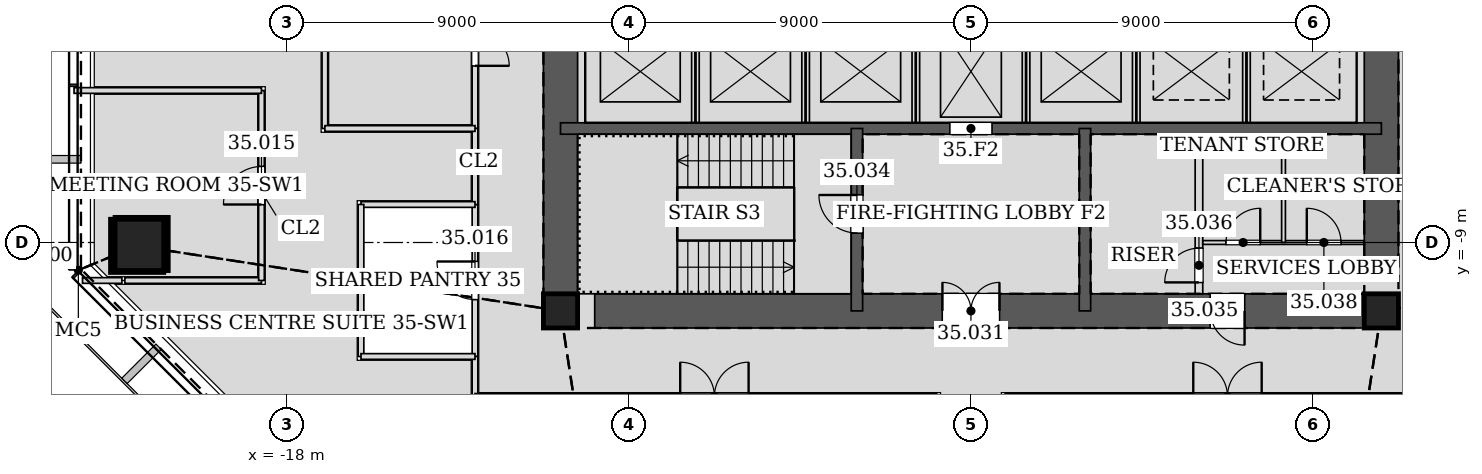
"""IFC4 building model, lengths in metres.
Left out: names, types, materials, properties, quantities, classifications, styles, units other than length and angle.
Written with IfcOpenShell. Run it as: python <this file> out.ifc"""

import sys

from ifc_helpers import new_model, si_unit, direction, frame, frame_2d, origin, origin_2d, place, context, subcontext, project, spatial, rectangle, hollow_rectangle, extrude, element, fill, save


model = new_model("IFC4")
c1 = context("Model", 3, precision=1e-05, world=origin(), true_north=direction((0.0, 1.0)))
c2 = subcontext(c1, "Body", "Model", "MODEL_VIEW")
j1 = project(units=[si_unit("LENGTHUNIT", "METRE"), si_unit("PLANEANGLEUNIT", "RADIAN")], contexts=[c1])
p1 = place(None, origin())
s1 = spatial("IfcSite", under=j1, at=p1, CompositionType="ELEMENT")
p2 = place(p1, origin())
s2 = spatial("IfcBuilding", under=s1, at=p2, CompositionType="ELEMENT")
p3 = place(p2, frame((0.0, 0.0, 155.4)))
s3 = spatial("IfcBuildingStorey", under=s2, at=p3, CompositionType="ELEMENT", Elevation=155.4)
p4 = place(p3, frame((-21.94, -9.088, 0.0), z_axis=(0.028294087032, 0.011735945751, 0.999530746009), x_axis=(-0.383133442967, 0.923693003589, 0.0)))
e1 = element("IfcColumn", 1, at=p4, inside=s3, PredefinedType="COLUMN", context=c2, shape_type="SweptSolid", body=[
    extrude(hollow_rectangle(XDim=1.4, YDim=1.4, WallThickness=0.065, at=origin_2d()), origin(), (0.0, 0.0, 1.0), 4.202),
])
for number, where, z_axis, x_axis in (
    (2, (-10.8, -10.8, 0.0), (0.0, 0.0, 1.0), (1.0, 0.0, 0.0)),
    (3, (10.8, -10.8, 0.0), (0.0, 0.0, 1.0), (1.0, 0.0, 0.0)),
):
    element("IfcColumn", number, at=place(p3, frame(where, z_axis=z_axis, x_axis=x_axis)), inside=s3, PredefinedType="COLUMN", context=c2, shape_type="SweptSolid", body=[
        extrude(hollow_rectangle(XDim=0.9, YDim=0.9, WallThickness=0.06, at=origin_2d()), origin(), (0.0, 0.0, 1.0), 4.2),
    ])
p5 = place(p3, frame((-10.8, -10.8, 0.0), z_axis=(0.0, 0.0, 1.0), x_axis=(1.0, 0.0, 0.0)))
e4 = element("IfcWall", 4, at=p5, inside=s3, PredefinedType="SOLIDWALL", context=c2, shape_type="SweptSolid", body=[
    extrude(rectangle(XDim=21.6, YDim=0.9, at=frame_2d((10.8, 0.0))), origin(), (0.0, 0.0, 1.0), 4.2),
])
p6 = place(p5, frame((10.05, 0.0, 0.0)))
e5 = element("IfcOpeningElement", 5, at=p6, cuts=e4, PredefinedType="OPENING", context=c2, shape_type="SweptSolid", body=[
    extrude(rectangle(XDim=1.5, YDim=2.1, at=frame_2d((0.75, 1.05))), frame((0.0, 0.46, 0.0), z_axis=(0.0, -1.0, 0.0), x_axis=(1.0, 0.0, 0.0)), (0.0, 0.0, 1.0), 0.92),
])
p7 = place(p5, frame((17.1, 0.0, 0.0)))
e6 = element("IfcOpeningElement", 6, at=p7, cuts=e4, PredefinedType="OPENING", context=c2, shape_type="SweptSolid", body=[
    extrude(rectangle(XDim=0.9, YDim=2.1, at=frame_2d((0.45, 1.05))), frame((0.0, 0.46, 0.0), z_axis=(0.0, -1.0, 0.0), x_axis=(1.0, 0.0, 0.0)), (0.0, 0.0, 1.0), 0.92),
])
p8 = place(p3, frame((10.8, -10.8, 0.0), z_axis=(0.0, 0.0, 1.0), x_axis=(0.0, 1.0, 0.0)))
e7 = element("IfcWall", 7, at=p8, inside=s3, PredefinedType="SOLIDWALL", context=c2, shape_type="SweptSolid", body=[
    extrude(rectangle(XDim=21.6, YDim=0.9, at=frame_2d((10.8, 0.0))), origin(), (0.0, 0.0, 1.0), 4.2),
])
p9 = place(p8, frame((11.7, 0.0, 0.0)))
e8 = element("IfcOpeningElement", 8, at=p9, cuts=e7, PredefinedType="OPENING", context=c2, shape_type="SweptSolid", body=[
    extrude(rectangle(XDim=1.2, YDim=2.1, at=frame_2d((0.6, 1.05))), frame((0.0, 0.46, 0.0), z_axis=(0.0, -1.0, 0.0), x_axis=(1.0, 0.0, 0.0)), (0.0, 0.0, 1.0), 0.92),
])
p10 = place(p8, frame((8.7, 0.0, 0.0)))
e9 = element("IfcOpeningElement", 9, at=p10, cuts=e7, PredefinedType="OPENING", context=c2, shape_type="SweptSolid", body=[
    extrude(rectangle(XDim=1.2, YDim=2.1, at=frame_2d((0.6, 1.05))), frame((0.0, 0.46, 0.0), z_axis=(0.0, -1.0, 0.0), x_axis=(1.0, 0.0, 0.0)), (0.0, 0.0, 1.0), 0.92),
])
p11 = place(p3, frame((-10.8, 10.8, 0.0), z_axis=(0.0, 0.0, 1.0), x_axis=(0.0, -1.0, 0.0)))
e10 = element("IfcWall", 10, at=p11, inside=s3, PredefinedType="SOLIDWALL", context=c2, shape_type="SweptSolid", body=[
    extrude(rectangle(XDim=21.6, YDim=0.9, at=frame_2d((10.8, 0.0))), origin(), (0.0, 0.0, 1.0), 4.2),
])
p12 = place(p11, frame((8.7, 0.0, 0.0)))
e11 = element("IfcOpeningElement", 11, at=p12, cuts=e10, PredefinedType="OPENING", context=c2, shape_type="SweptSolid", body=[
    extrude(rectangle(XDim=1.2, YDim=2.1, at=frame_2d((0.6, 1.05))), frame((0.0, 0.46, 0.0), z_axis=(0.0, -1.0, 0.0), x_axis=(1.0, 0.0, 0.0)), (0.0, 0.0, 1.0), 0.92),
])
p13 = place(p11, frame((11.7, 0.0, 0.0)))
e12 = element("IfcOpeningElement", 12, at=p13, cuts=e10, PredefinedType="OPENING", context=c2, shape_type="SweptSolid", body=[
    extrude(rectangle(XDim=1.2, YDim=2.1, at=frame_2d((0.6, 1.05))), frame((0.0, 0.46, 0.0), z_axis=(0.0, -1.0, 0.0), x_axis=(1.0, 0.0, 0.0)), (0.0, 0.0, 1.0), 0.92),
])
p14 = place(p3, frame((-10.8, -6.0, 0.0), z_axis=(0.0, 0.0, 1.0), x_axis=(1.0, 0.0, 0.0)))
e13 = element("IfcWall", 13, at=p14, inside=s3, PredefinedType="SOLIDWALL", context=c2, shape_type="SweptSolid", body=[
    extrude(rectangle(XDim=21.6, YDim=0.3, at=frame_2d((10.8, 0.0))), origin(), (0.0, 0.0, 1.0), 4.2),
])
p15 = place(p14, frame((10.25, 0.0, 0.0)))
e14 = element("IfcOpeningElement", 14, at=p15, cuts=e13, PredefinedType="OPENING", context=c2, shape_type="SweptSolid", body=[
    extrude(rectangle(XDim=1.1, YDim=2.1, at=frame_2d((0.55, 1.05))), frame((0.0, 0.16, 0.0), z_axis=(0.0, -1.0, 0.0), x_axis=(1.0, 0.0, 0.0)), (0.0, 0.0, 1.0), 0.32),
])
p16 = place(p3, frame((-3.0, -6.0, 0.0), z_axis=(0.0, 0.0, 1.0), x_axis=(0.0, -1.0, 0.0)))
e15 = element("IfcWall", 15, at=p16, inside=s3, PredefinedType="SOLIDWALL", context=c2, shape_type="SweptSolid", body=[
    extrude(rectangle(XDim=4.8, YDim=0.3, at=frame_2d((2.4, 0.0))), origin(), (0.0, 0.0, 1.0), 4.2),
])
p17 = place(p16, frame((1.75, 0.0, 0.0)))
e16 = element("IfcOpeningElement", 16, at=p17, cuts=e15, PredefinedType="OPENING", context=c2, shape_type="SweptSolid", body=[
    extrude(rectangle(XDim=1.0, YDim=2.1, at=frame_2d((0.5, 1.05))), frame((0.0, 0.16, 0.0), z_axis=(0.0, -1.0, 0.0), x_axis=(1.0, 0.0, 0.0)), (0.0, 0.0, 1.0), 0.32),
])
p18 = place(p3, frame((3.0, -6.0, 0.0), z_axis=(0.0, 0.0, 1.0), x_axis=(0.0, -1.0, 0.0)))
e17 = element("IfcWall", 17, at=p18, inside=s3, PredefinedType="SOLIDWALL", context=c2, shape_type="SweptSolid", body=[
    extrude(rectangle(XDim=4.8, YDim=0.3, at=frame_2d((2.4, 0.0))), origin(), (0.0, 0.0, 1.0), 4.2),
])
p19 = place(p3, frame((-13.05, -7.999, 0.0), z_axis=(0.0, 0.0, 1.0), x_axis=(0.0, -1.0, 0.0)))
e18 = element("IfcWall", 18, at=p19, inside=s3, PredefinedType="PARTITIONING", context=c2, shape_type="SweptSolid", body=[
    extrude(rectangle(XDim=4.002, YDim=0.15, at=frame_2d((2.001, 0.0))), origin(), (0.0, 0.0, 1.0), 3.098),
])
p20 = place(p19, frame((1.501, 0.0, 0.0)))
e19 = element("IfcOpeningElement", 19, at=p20, cuts=e18, PredefinedType="OPENING", context=c2, shape_type="SweptSolid", body=[
    extrude(rectangle(XDim=1.0, YDim=2.1, at=frame_2d((0.5, 1.05))), frame((0.0, 0.085, 0.0), z_axis=(0.0, -1.0, 0.0), x_axis=(1.0, 0.0, 0.0)), (0.0, 0.0, 1.0), 0.17),
])
p21 = place(p3, frame((-13.05, -0.9, 0.0), z_axis=(0.0, 0.0, 1.0), x_axis=(0.0, -1.0, 0.0)))
e20 = element("IfcWall", 20, at=p21, inside=s3, PredefinedType="PARTITIONING", context=c2, shape_type="SweptSolid", body=[
    extrude(rectangle(XDim=5.101, YDim=0.15, at=frame_2d((2.551, 0.0))), origin(), (0.0, 0.0, 1.0), 4.035),
])
p22 = place(p21, frame((1.65, 0.0, 0.0)))
e21 = element("IfcOpeningElement", 21, at=p22, cuts=e20, PredefinedType="OPENING", context=c2, shape_type="SweptSolid", body=[
    extrude(rectangle(XDim=1.8, YDim=2.4, at=frame_2d((0.9, 1.2))), frame((0.0, 0.085, 0.0), z_axis=(0.0, -1.0, 0.0), x_axis=(1.0, 0.0, 0.0)), (0.0, 0.0, 1.0), 0.17),
])
p23 = place(p3, frame((-13.05, -11.999, 0.0), z_axis=(0.0, 0.0, 1.0), x_axis=(0.0, -1.0, 0.0)))
e22 = element("IfcWall", 22, at=p23, inside=s3, PredefinedType="PARTITIONING", context=c2, shape_type="SweptSolid", body=[
    extrude(rectangle(XDim=1.051, YDim=0.15, at=frame_2d((0.525, 0.0))), origin(), (0.0, 0.0, 1.0), 3.332),
])
p24 = place(p3, frame((-13.05, -13.05, 0.0), z_axis=(0.0, 0.0, 1.0), x_axis=(1.0, 0.0, 0.0)))
e23 = element("IfcWall", 23, at=p24, inside=s3, PredefinedType="PARTITIONING", context=c2, shape_type="SweptSolid", body=[
    extrude(rectangle(XDim=0.451, YDim=0.15, at=frame_2d((0.226, 0.0))), origin(), (0.0, 0.0, 1.0), 3.332),
])
p25 = place(p3, frame((-13.05, -5.999, 0.0), z_axis=(0.0, 0.0, 1.0), x_axis=(0.0, -1.0, 0.0)))
e24 = element("IfcWall", 24, at=p25, inside=s3, PredefinedType="PARTITIONING", context=c2, shape_type="SweptSolid", body=[
    extrude(rectangle(XDim=2.002, YDim=0.15, at=frame_2d((1.001, 0.0))), origin(), (0.0, 0.0, 1.0), 4.035),
])
p26 = place(p3, frame((-12.601, -13.05, 0.0), z_axis=(0.0, 0.0, 1.0), x_axis=(1.0, 0.0, 0.0)))
e25 = element("IfcWall", 25, at=p26, inside=s3, PredefinedType="PARTITIONING", context=c2, shape_type="SweptSolid", body=[
    extrude(rectangle(XDim=11.701, YDim=0.15, at=frame_2d((5.851, 0.0))), origin(), (0.0, 0.0, 1.0), 3.098),
])
p27 = place(p26, frame((4.95, 0.0, 0.0)))
e26 = element("IfcOpeningElement", 26, at=p27, cuts=e25, PredefinedType="OPENING", context=c2, shape_type="SweptSolid", body=[
    extrude(rectangle(XDim=1.8, YDim=2.4, at=frame_2d((0.9, 1.2))), frame((0.0, 0.085, 0.0), z_axis=(0.0, -1.0, 0.0), x_axis=(1.0, 0.0, 0.0)), (0.0, 0.0, 1.0), 0.17),
])
p28 = place(p3, frame((0.9, -13.05, 0.0), z_axis=(0.0, 0.0, 1.0), x_axis=(1.0, 0.0, 0.0)))
e27 = element("IfcWall", 27, at=p28, inside=s3, PredefinedType="PARTITIONING", context=c2, shape_type="SweptSolid", body=[
    extrude(rectangle(XDim=11.701, YDim=0.15, at=frame_2d((5.851, 0.0))), origin(), (0.0, 0.0, 1.0), 3.098),
])
p29 = place(p28, frame((4.95, 0.0, 0.0)))
e28 = element("IfcOpeningElement", 28, at=p29, cuts=e27, PredefinedType="OPENING", context=c2, shape_type="SweptSolid", body=[
    extrude(rectangle(XDim=1.8, YDim=2.4, at=frame_2d((0.9, 1.2))), frame((0.0, 0.085, 0.0), z_axis=(0.0, -1.0, 0.0), x_axis=(1.0, 0.0, 0.0)), (0.0, 0.0, 1.0), 0.17),
])
p30 = place(p3, frame((-23.378, -10.0, 0.0), z_axis=(0.0, 0.0, 1.0), x_axis=(1.0, 0.0, 0.0)))
e29 = element("IfcWall", 29, at=p30, inside=s3, PredefinedType="PARTITIONING", context=c2, shape_type="SweptSolid", body=[
    extrude(rectangle(XDim=1.037, YDim=0.15, at=frame_2d((0.518, 0.0))), origin(), (0.0, 0.0, 1.0), 4.035),
])
p31 = place(p3, frame((-22.263, -10.0, 0.0), z_axis=(0.0, 0.0, 1.0), x_axis=(1.0, 0.0, 0.0)))
e30 = element("IfcWall", 30, at=p31, inside=s3, PredefinedType="PARTITIONING", context=c2, shape_type="SweptSolid", body=[
    extrude(rectangle(XDim=3.594, YDim=0.15, at=frame_2d((1.797, 0.0))), origin(), (0.0, 0.0, 1.0), 3.499),
])
p32 = place(p3, frame((-18.669, -10.0, 0.0), z_axis=(0.0, 0.0, 1.0), x_axis=(0.0, 1.0, 0.0)))
e31 = element("IfcWall", 31, at=p32, inside=s3, PredefinedType="PARTITIONING", context=c2, shape_type="SweptSolid", body=[
    extrude(rectangle(XDim=5.0, YDim=0.15, at=frame_2d((2.5, 0.0))), origin(), (0.0, 0.0, 1.0), 3.098),
])
p33 = place(p32, frame((2.0, 0.0, 0.0)))
e32 = element("IfcOpeningElement", 32, at=p33, cuts=e31, PredefinedType="OPENING", context=c2, shape_type="SweptSolid", body=[
    extrude(rectangle(XDim=1.0, YDim=2.1, at=frame_2d((0.5, 1.05))), frame((0.0, 0.085, 0.0), z_axis=(0.0, -1.0, 0.0), x_axis=(1.0, 0.0, 0.0)), (0.0, 0.0, 1.0), 0.17),
])
p34 = place(p3, frame((-18.669, -5.0, 0.0), z_axis=(0.0, 0.0, 1.0), x_axis=(-1.0, 0.0, 0.0)))
e33 = element("IfcWall", 33, at=p34, inside=s3, PredefinedType="PARTITIONING", context=c2, shape_type="SweptSolid", body=[
    extrude(rectangle(XDim=4.932, YDim=0.15, at=frame_2d((2.466, 0.0))), origin(), (0.0, 0.0, 1.0), 3.423),
])
p35 = place(p3, frame((-13.05, -8.0, 0.0), z_axis=(0.0, 0.0, 1.0), x_axis=(-1.0, 0.0, 0.0)))
e34 = element("IfcWall", 34, at=p35, inside=s3, PredefinedType="PARTITIONING", context=c2, shape_type="SweptSolid", body=[
    extrude(rectangle(XDim=3.0, YDim=0.15, at=frame_2d((1.5, 0.0))), origin(), (0.0, 0.0, 1.0), 3.492),
])
p36 = place(p3, frame((-16.05, -8.0, 0.0), z_axis=(0.0, 0.0, 1.0), x_axis=(0.0, -1.0, 0.0)))
e35 = element("IfcWall", 35, at=p36, inside=s3, PredefinedType="PARTITIONING", context=c2, shape_type="SweptSolid", body=[
    extrude(rectangle(XDim=4.0, YDim=0.15, at=frame_2d((2.0, 0.0))), origin(), (0.0, 0.0, 1.0), 3.098),
])
p37 = place(p3, frame((-16.05, -12.0, 0.0), z_axis=(0.0, 0.0, 1.0), x_axis=(1.0, 0.0, 0.0)))
e36 = element("IfcWall", 36, at=p37, inside=s3, PredefinedType="PARTITIONING", context=c2, shape_type="SweptSolid", body=[
    extrude(rectangle(XDim=3.0, YDim=0.15, at=frame_2d((1.5, 0.0))), origin(), (0.0, 0.0, 1.0), 3.715),
])
p38 = place(p3, frame((-17.0, -0.9, 0.0), z_axis=(0.0, 0.0, 1.0), x_axis=(0.0, -1.0, 0.0)))
e37 = element("IfcWall", 37, at=p38, inside=s3, PredefinedType="PARTITIONING", context=c2, shape_type="SweptSolid", body=[
    extrude(rectangle(XDim=5.1, YDim=0.15, at=frame_2d((2.55, 0.0))), origin(), (0.0, 0.0, 1.0), 4.035),
])
p39 = place(p3, frame((-17.0, -6.0, 0.0), z_axis=(0.0, 0.0, 1.0), x_axis=(1.0, 0.0, 0.0)))
e38 = element("IfcWall", 38, at=p39, inside=s3, PredefinedType="PARTITIONING", context=c2, shape_type="SweptSolid", body=[
    extrude(rectangle(XDim=3.95, YDim=0.15, at=frame_2d((1.975, 0.0))), origin(), (0.0, 0.0, 1.0), 3.492),
])
for number, where, z_axis, x_axis in (
    (39, (-7.25, -5.85, 0.0), (0.0, 0.0, 1.0), (0.0, 1.0, 0.0)),
    (40, (-4.35, -5.85, 0.0), (0.0, 0.0, 1.0), (0.0, 1.0, 0.0)),
    (41, (-1.45, -5.85, 0.0), (0.0, 0.0, 1.0), (0.0, 1.0, 0.0)),
    (42, (1.45, -5.85, 0.0), (0.0, 0.0, 1.0), (0.0, 1.0, 0.0)),
    (43, (4.35, -5.85, 0.0), (0.0, 0.0, 1.0), (0.0, 1.0, 0.0)),
    (44, (7.25, -5.85, 0.0), (0.0, 0.0, 1.0), (0.0, 1.0, 0.0)),
):
    element("IfcWall", number, at=place(p3, frame(where, z_axis=z_axis, x_axis=x_axis)), inside=s3, PredefinedType="PARTITIONING", context=c2, shape_type="SweptSolid", body=[
        extrude(rectangle(XDim=2.7, YDim=0.2, at=frame_2d((1.35, 0.0))), origin(), (0.0, 0.0, 1.0), 4.2),
    ])
p40 = place(p3, frame((6.0, -10.35, 0.0), z_axis=(0.0, 0.0, 1.0), x_axis=(0.0, 1.0, 0.0)))
e45 = element("IfcWall", 45, at=p40, inside=s3, PredefinedType="PARTITIONING", context=c2, shape_type="SweptSolid", body=[
    extrude(rectangle(XDim=4.2, YDim=0.2, at=frame_2d((2.1, 0.0))), origin(), (0.0, 0.0, 1.0), 4.035),
])
p41 = place(p40, frame((0.3, 0.0, 0.0)))
e46 = element("IfcOpeningElement", 46, at=p41, cuts=e45, PredefinedType="OPENING", context=c2, shape_type="SweptSolid", body=[
    extrude(rectangle(XDim=0.9, YDim=2.1, at=frame_2d((0.45, 1.05))), frame((0.0, 0.11, 0.0), z_axis=(0.0, -1.0, 0.0), x_axis=(1.0, 0.0, 0.0)), (0.0, 0.0, 1.0), 0.22),
])
p42 = place(p3, frame((6.1, -9.0, 0.0), z_axis=(0.0, 0.0, 1.0), x_axis=(1.0, 0.0, 0.0)))
e47 = element("IfcWall", 47, at=p42, inside=s3, PredefinedType="PARTITIONING", context=c2, shape_type="SweptSolid", body=[
    extrude(rectangle(XDim=4.25, YDim=0.1, at=frame_2d((2.125, 0.0))), origin(), (0.0, 0.0, 1.0), 4.035),
])
p43 = place(p42, frame((0.613, 0.0, 0.0)))
e48 = element("IfcOpeningElement", 48, at=p43, cuts=e47, PredefinedType="OPENING", context=c2, shape_type="SweptSolid", body=[
    extrude(rectangle(XDim=0.9, YDim=2.1, at=frame_2d((0.45, 1.05))), frame((0.0, 0.06, 0.0), z_axis=(0.0, -1.0, 0.0), x_axis=(1.0, 0.0, 0.0)), (0.0, 0.0, 1.0), 0.12),
])
p44 = place(p42, frame((2.738, 0.0, 0.0)))
e49 = element("IfcOpeningElement", 49, at=p44, cuts=e47, PredefinedType="OPENING", context=c2, shape_type="SweptSolid", body=[
    extrude(rectangle(XDim=0.9, YDim=2.1, at=frame_2d((0.45, 1.05))), frame((0.0, 0.06, 0.0), z_axis=(0.0, -1.0, 0.0), x_axis=(1.0, 0.0, 0.0)), (0.0, 0.0, 1.0), 0.12),
])
p45 = place(p3, frame((8.225, -9.0, 0.0), z_axis=(0.0, 0.0, 1.0), x_axis=(0.0, 1.0, 0.0)))
e50 = element("IfcWall", 50, at=p45, inside=s3, PredefinedType="PARTITIONING", context=c2, shape_type="SweptSolid", body=[
    extrude(rectangle(XDim=2.85, YDim=0.1, at=frame_2d((1.425, 0.0))), origin(), (0.0, 0.0, 1.0), 4.035),
])
p46 = place(p33, origin())
e51 = element("IfcDoor", 51, at=p46, inside=s3, OperationType="SINGLE_SWING_LEFT", PredefinedType="DOOR", context=c2, shape_type="SweptSolid", body=[
    extrude(rectangle(XDim=1.0, YDim=2.1, at=frame_2d((0.5, 1.05))), frame((0.0, 0.025, 0.0), z_axis=(0.0, -1.0, 0.0), x_axis=(1.0, 0.0, 0.0)), (0.0, 0.0, 1.0), 0.05),
])
fill(e32, e51)
p47 = place(p20, frame((1.0, 0.0, 0.0), z_axis=(0.0, 0.0, 1.0), x_axis=(-1.0, 0.0, 0.0)))
e52 = element("IfcDoor", 52, at=p47, inside=s3, OperationType="SINGLE_SWING_RIGHT", PredefinedType="DOOR", context=c2, shape_type="SweptSolid", body=[
    extrude(rectangle(XDim=1.0, YDim=2.1, at=frame_2d((0.5, 1.05))), frame((0.0, 0.025, 0.0), z_axis=(0.0, -1.0, 0.0), x_axis=(1.0, 0.0, 0.0)), (0.0, 0.0, 1.0), 0.05),
])
fill(e19, e52)
p48 = place(p22, origin())
e53 = element("IfcDoor", 53, at=p48, inside=s3, OperationType="DOUBLE_DOOR_SINGLE_SWING", PredefinedType="DOOR", context=c2, shape_type="SweptSolid", body=[
    extrude(rectangle(XDim=1.8, YDim=2.4, at=frame_2d((0.9, 1.2))), frame((0.0, 0.025, 0.0), z_axis=(0.0, -1.0, 0.0), x_axis=(1.0, 0.0, 0.0)), (0.0, 0.0, 1.0), 0.05),
])
fill(e21, e53)
p49 = place(p6, origin())
e54 = element("IfcDoor", 54, at=p49, inside=s3, OperationType="DOUBLE_DOOR_SINGLE_SWING", PredefinedType="DOOR", context=c2, shape_type="SweptSolid", body=[
    extrude(rectangle(XDim=1.5, YDim=2.1, at=frame_2d((0.75, 1.05))), frame((0.0, 0.025, 0.0), z_axis=(0.0, -1.0, 0.0), x_axis=(1.0, 0.0, 0.0)), (0.0, 0.0, 1.0), 0.05),
])
fill(e5, e54)
p50 = place(p17, frame((1.0, 0.0, 0.0), z_axis=(0.0, 0.0, 1.0), x_axis=(-1.0, 0.0, 0.0)))
e55 = element("IfcDoor", 55, at=p50, inside=s3, OperationType="SINGLE_SWING_RIGHT", PredefinedType="DOOR", context=c2, shape_type="SweptSolid", body=[
    extrude(rectangle(XDim=1.0, YDim=2.1, at=frame_2d((0.5, 1.05))), frame((0.0, 0.025, 0.0), z_axis=(0.0, -1.0, 0.0), x_axis=(1.0, 0.0, 0.0)), (0.0, 0.0, 1.0), 0.05),
])
fill(e16, e55)
p51 = place(p7, frame((0.9, 0.0, 0.0), z_axis=(0.0, 0.0, 1.0), x_axis=(-1.0, 0.0, 0.0)))
e56 = element("IfcDoor", 56, at=p51, inside=s3, OperationType="SINGLE_SWING_LEFT", PredefinedType="DOOR", context=c2, shape_type="SweptSolid", body=[
    extrude(rectangle(XDim=0.9, YDim=2.1, at=frame_2d((0.45, 1.05))), frame((0.0, 0.025, 0.0), z_axis=(0.0, -1.0, 0.0), x_axis=(1.0, 0.0, 0.0)), (0.0, 0.0, 1.0), 0.05),
])
fill(e6, e56)
p52 = place(p41, origin())
e57 = element("IfcDoor", 57, at=p52, inside=s3, OperationType="SINGLE_SWING_LEFT", PredefinedType="DOOR", context=c2, shape_type="SweptSolid", body=[
    extrude(rectangle(XDim=0.9, YDim=2.1, at=frame_2d((0.45, 1.05))), frame((0.0, 0.025, 0.0), z_axis=(0.0, -1.0, 0.0), x_axis=(1.0, 0.0, 0.0)), (0.0, 0.0, 1.0), 0.05),
])
fill(e46, e57)
p53 = place(p43, origin())
e58 = element("IfcDoor", 58, at=p53, inside=s3, OperationType="SINGLE_SWING_RIGHT", PredefinedType="DOOR", context=c2, shape_type="SweptSolid", body=[
    extrude(rectangle(XDim=0.9, YDim=2.1, at=frame_2d((0.45, 1.05))), frame((0.0, 0.025, 0.0), z_axis=(0.0, -1.0, 0.0), x_axis=(1.0, 0.0, 0.0)), (0.0, 0.0, 1.0), 0.05),
])
fill(e48, e58)
p54 = place(p44, origin())
e59 = element("IfcDoor", 59, at=p54, inside=s3, OperationType="SINGLE_SWING_LEFT", PredefinedType="DOOR", context=c2, shape_type="SweptSolid", body=[
    extrude(rectangle(XDim=0.9, YDim=2.1, at=frame_2d((0.45, 1.05))), frame((0.0, 0.025, 0.0), z_axis=(0.0, -1.0, 0.0), x_axis=(1.0, 0.0, 0.0)), (0.0, 0.0, 1.0), 0.05),
])
fill(e49, e59)
p55 = place(p15, origin())
e60 = element("IfcDoor", 60, at=p55, inside=s3, OperationType="DOUBLE_DOOR_SLIDING", PredefinedType="DOOR", context=c2, shape_type="SweptSolid", body=[
    extrude(rectangle(XDim=1.1, YDim=2.1, at=frame_2d((0.55, 1.05))), frame((0.0, 0.025, 0.0), z_axis=(0.0, -1.0, 0.0), x_axis=(1.0, 0.0, 0.0)), (0.0, 0.0, 1.0), 0.05),
])
fill(e14, e60)
save(model, sys.argv[1])
